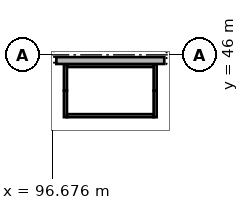
"""IFC4 building model, lengths in metres.
Left out: names, types, materials, properties, quantities, classifications, styles, units other than length and angle.
Written with IfcOpenShell. Run it as: python <this file> out.ifc"""

import sys

from ifc_helpers import new_model, si_unit, direction, frame, frame_2d, origin, origin_2d, place, context, subcontext, project, spatial, rectangle, extrude, element, fill, save


model = new_model("IFC4")
c1 = context("Model", 3, precision=1e-05, world=origin(), true_north=direction((0.0, 1.0)))
c2 = subcontext(c1, "Body", "Model", "MODEL_VIEW")
j1 = project(units=[si_unit("LENGTHUNIT", "METRE"), si_unit("PLANEANGLEUNIT", "RADIAN")], contexts=[c1])
p1 = place(None, origin())
s1 = spatial("IfcSite", under=j1, at=p1, CompositionType="ELEMENT")
p2 = place(p1, origin())
s2 = spatial("IfcBuilding", under=s1, at=p2, CompositionType="ELEMENT")
p3 = place(p2, origin())
s3 = spatial("IfcBuildingStorey", under=s2, at=p3, CompositionType="ELEMENT", Elevation=0.0)
for number, where, z_axis, x_axis in (
    (1, (96.0, 46.0, 0.0), (0.0, 0.0, 1.0), (1.0, 0.0, 0.0)),
    (2, (105.0, 46.0, 0.0), (0.0, 0.0, 1.0), (1.0, 0.0, 0.0)),
):
    element("IfcColumn", number, at=place(p3, frame(where, z_axis=z_axis, x_axis=x_axis)), inside=s3, PredefinedType="COLUMN", context=c2, shape_type="SweptSolid", body=[
        extrude(rectangle(XDim=1.6, YDim=1.2, at=origin_2d()), origin(), (0.0, 0.0, 1.0), 5.0),
    ])
for number, where, z_axis, x_axis in (
    (3, (97.55, 45.4, 0.0), (0.0, 0.0, 1.0), (0.0, -1.0, 0.0)),
    (4, (97.55, 43.65, 0.0), (0.0, 0.0, 1.0), (0.0, -1.0, 0.0)),
    (5, (103.45, 45.4, 0.0), (0.0, 0.0, 1.0), (0.0, -1.0, 0.0)),
    (6, (103.45, 43.65, 0.0), (0.0, 0.0, 1.0), (0.0, -1.0, 0.0)),
):
    element("IfcWall", number, at=place(p3, frame(where, z_axis=z_axis, x_axis=x_axis)), inside=s3, PredefinedType="SOLIDWALL", context=c2, shape_type="SweptSolid", body=[
        extrude(rectangle(XDim=1.75, YDim=0.2, at=frame_2d((0.875, 0.0))), origin(), (0.0, 0.0, 1.0), 3.2),
    ])
p4 = place(p3, frame((97.65, 42.0, 0.0), z_axis=(0.0, 0.0, 1.0), x_axis=(1.0, 0.0, 0.0)))
e7 = element("IfcWall", 7, at=p4, inside=s3, PredefinedType="SOLIDWALL", context=c2, shape_type="SweptSolid", body=[
    extrude(rectangle(XDim=5.7, YDim=0.2, at=frame_2d((2.85, 0.0))), origin(), (0.0, 0.0, 1.0), 3.2),
])
p5 = place(p4, frame((0.2, 0.0, 0.0)))
e8 = element("IfcOpeningElement", 8, at=p5, cuts=e7, PredefinedType="OPENING", context=c2, shape_type="SweptSolid", body=[
    extrude(rectangle(XDim=1.1, YDim=2.1, at=frame_2d((0.55, 1.05))), frame((0.0, 0.11, 0.0), z_axis=(0.0, -1.0, 0.0), x_axis=(1.0, 0.0, 0.0)), (0.0, 0.0, 1.0), 0.22),
])
p6 = place(p3, frame((97.65, 45.3, 0.0), z_axis=(0.0, 0.0, 1.0), x_axis=(1.0, 0.0, 0.0)))
e9 = element("IfcWall", 9, at=p6, inside=s3, PredefinedType="SOLIDWALL", context=c2, shape_type="SweptSolid", body=[
    extrude(rectangle(XDim=5.7, YDim=0.2, at=frame_2d((2.85, 0.0))), origin(), (0.0, 0.0, 1.0), 3.2),
])
p7 = place(p3, frame((96.95, 45.625, 0.0), z_axis=(0.0, 0.0, 1.0), x_axis=(1.0, 0.0, 0.0)))
e10 = element("IfcWall", 10, at=p7, inside=s3, PredefinedType="SOLIDWALL", context=c2, shape_type="SweptSolid", body=[
    extrude(rectangle(XDim=7.1, YDim=0.45, at=frame_2d((3.55, 0.0))), origin(), (0.0, 0.0, 1.0), 5.0),
])
p8 = place(p5, frame((1.1, 0.0, 0.0), z_axis=(0.0, 0.0, 1.0), x_axis=(-1.0, 0.0, 0.0)))
e11 = element("IfcDoor", 11, at=p8, inside=s3, OperationType="SINGLE_SWING_RIGHT", PredefinedType="DOOR", context=c2, shape_type="SweptSolid", body=[
    extrude(rectangle(XDim=1.1, YDim=2.1, at=frame_2d((0.55, 1.05))), frame((0.0, 0.025, 0.0), z_axis=(0.0, -1.0, 0.0), x_axis=(1.0, 0.0, 0.0)), (0.0, 0.0, 1.0), 0.05),
])
fill(e8, e11)
save(model, sys.argv[1])
